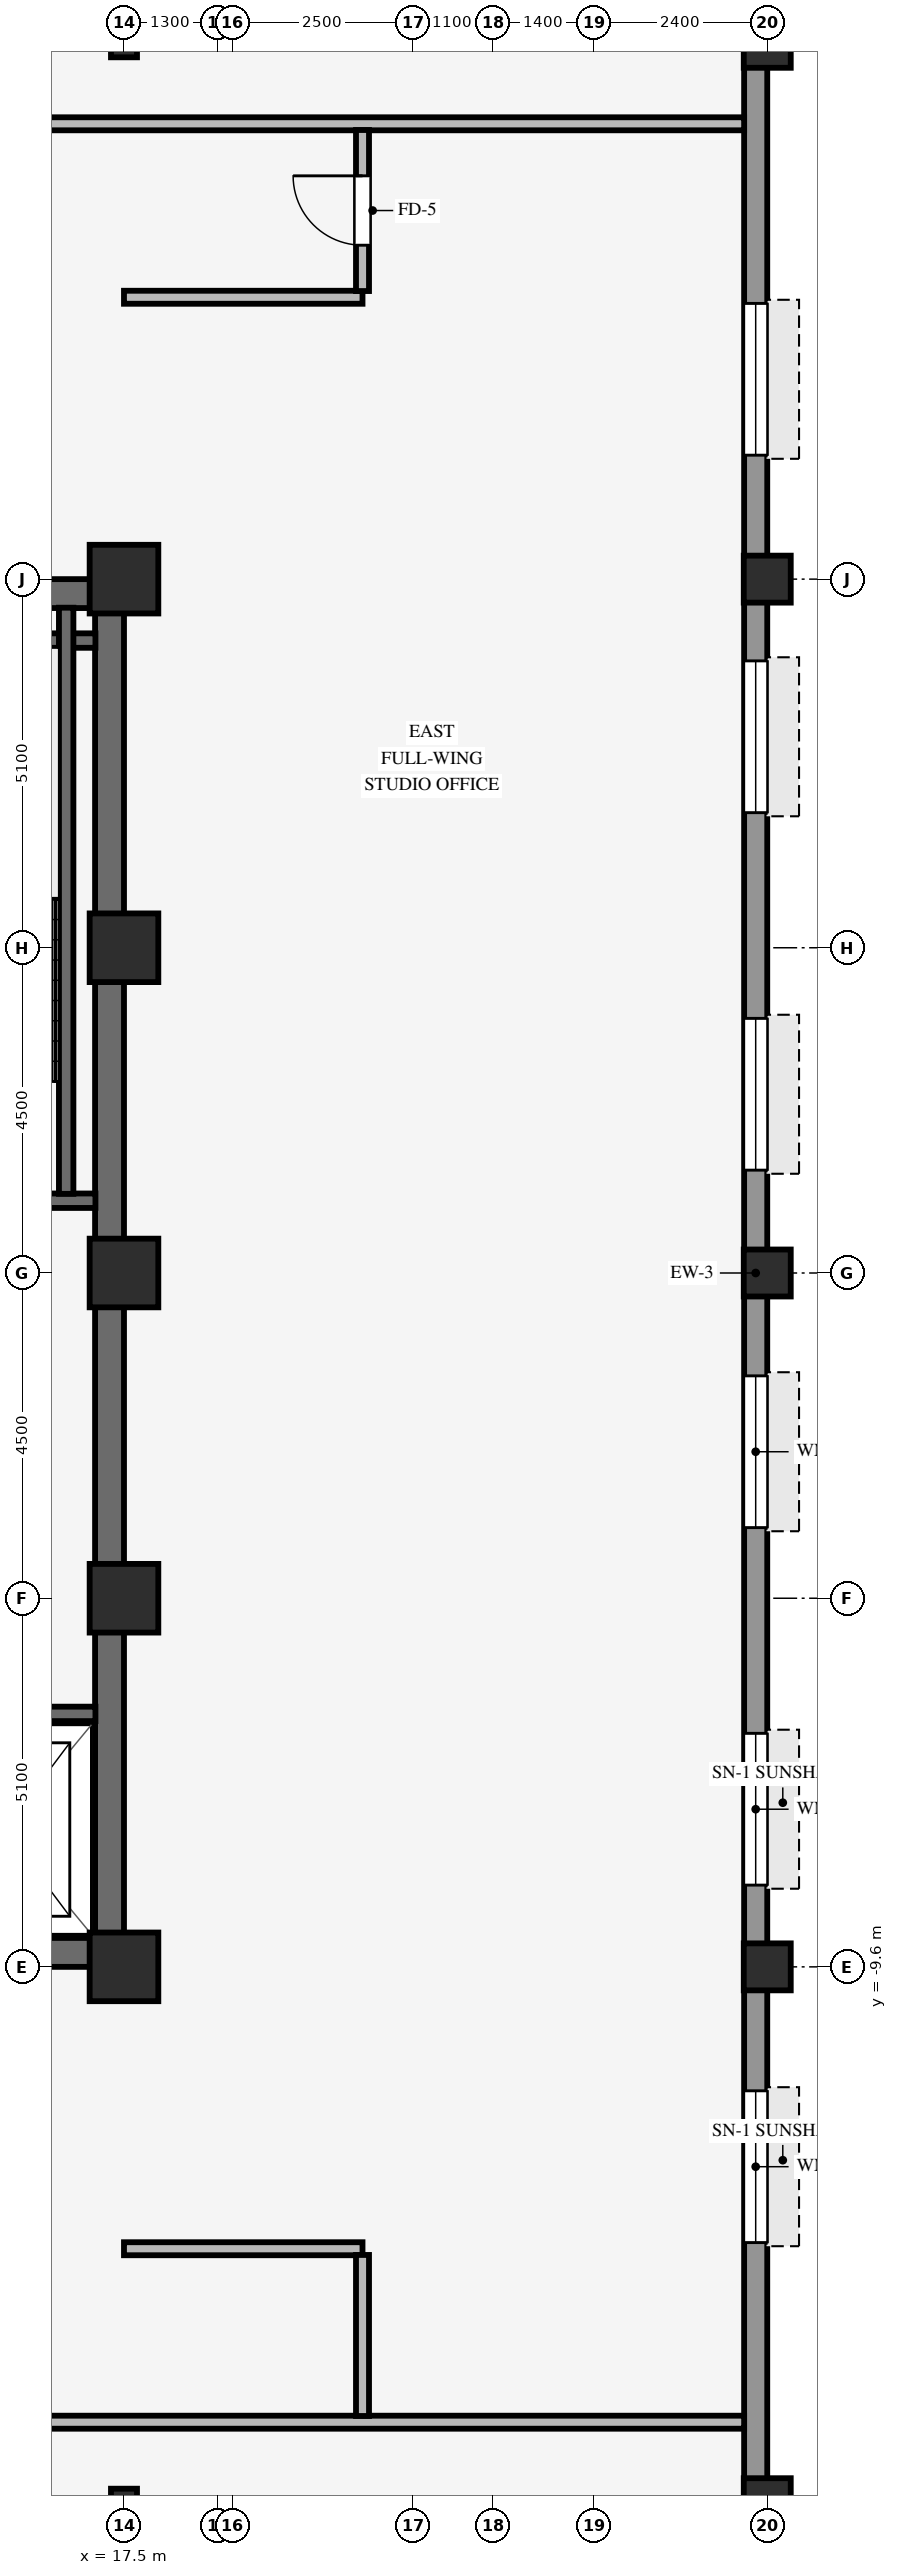
"""IFC4 building model, lengths in metres.
Left out: names, types, materials, properties, quantities, classifications, styles, units other than length and angle.
Written with IfcOpenShell. Run it as: python <this file> out.ifc"""

import sys

from ifc_helpers import new_model, si_unit, direction, frame, frame_2d, origin, origin_2d, place, context, subcontext, project, spatial, rectangle, hollow_rectangle, i_section, extrude, source, transform, mapped, element, fill, save


model = new_model("IFC4")
c1 = context("Model", 3, precision=1e-05, world=origin(), true_north=direction((0.0, 1.0)))
c2 = subcontext(c1, "Body", "Model", "MODEL_VIEW")
j1 = project(units=[si_unit("LENGTHUNIT", "METRE"), si_unit("PLANEANGLEUNIT", "RADIAN")], contexts=[c1])
p1 = place(None, origin())
s1 = spatial("IfcSite", under=j1, at=p1, CompositionType="ELEMENT")
p2 = place(p1, origin())
s2 = spatial("IfcBuilding", under=s1, at=p2, CompositionType="ELEMENT")
p3 = place(p2, frame((0.0, 0.0, 153.05)))
s3 = spatial("IfcBuildingStorey", under=s2, at=p3, CompositionType="ELEMENT", Elevation=153.05)
for number, where, z_axis, x_axis in (
    (1, (9.0, -9.4, 0.0), (0.0, 0.0, 1.0), (1.0, 0.0, 0.0)),
    (2, (9.0, 9.4, 0.0), (0.0, 0.0, 1.0), (1.0, 0.0, 0.0)),
):
    element("IfcWall", number, at=place(p3, frame(where, z_axis=z_axis, x_axis=x_axis)), inside=s3, PredefinedType="SHEAR", context=c2, shape_type="SweptSolid", body=[
        extrude(rectangle(XDim=8.5, YDim=0.4, at=frame_2d((4.25, 0.0))), origin(), (0.0, 0.0, 1.0), 3.37),
    ])
p4 = place(p3, frame((17.3, -9.205, 0.0), z_axis=(0.0, 0.0, 1.0), x_axis=(0.0, 1.0, 0.0)))
e3 = element("IfcWall", 3, at=p4, inside=s3, PredefinedType="SHEAR", context=c2, shape_type="SweptSolid", body=[
    extrude(rectangle(XDim=18.41, YDim=0.4, at=frame_2d((9.205, 0.0))), origin(), (0.0, 0.0, 1.0), 3.37),
])
for number, where, z_axis, x_axis in (
    (4, (17.5, -9.6, 0.0), (0.0, 0.0, 1.0), (1.0, 0.0, 0.0)),
    (5, (17.5, -4.5, 0.0), (0.0, 0.0, 1.0), (1.0, 0.0, 0.0)),
    (6, (17.5, 4.5, 0.0), (0.0, 0.0, 1.0), (1.0, 0.0, 0.0)),
    (7, (17.5, 9.6, 0.0), (0.0, 0.0, 1.0), (1.0, 0.0, 0.0)),
    (8, (17.5, 0.0, 0.0), (0.0, 0.0, 1.0), (1.0, 0.0, 0.0)),
):
    element("IfcColumn", number, at=place(p3, frame(where, z_axis=z_axis, x_axis=x_axis)), inside=s3, PredefinedType="COLUMN", context=c2, shape_type="SweptSolid", body=[
        extrude(rectangle(XDim=0.95, YDim=0.95, at=origin_2d()), origin(), (0.0, 0.0, 1.0), 3.37),
    ])
for number, where, z_axis, x_axis in (
    (9, (26.4, -17.0, 0.0), (0.0, 0.0, 1.0), (1.0, 0.0, 0.0)),
    (10, (26.4, -9.6, 0.0), (0.0, 0.0, 1.0), (1.0, 0.0, 0.0)),
    (11, (26.4, 0.0, 0.0), (0.0, 0.0, 1.0), (1.0, 0.0, 0.0)),
    (12, (26.4, 9.6, 0.0), (0.0, 0.0, 1.0), (1.0, 0.0, 0.0)),
    (13, (26.4, 17.0, 0.0), (0.0, 0.0, 1.0), (1.0, 0.0, 0.0)),
):
    element("IfcColumn", number, at=place(p3, frame(where, z_axis=z_axis, x_axis=x_axis)), inside=s3, PredefinedType="COLUMN", context=c2, shape_type="SweptSolid", body=[
        extrude(hollow_rectangle(XDim=0.65, YDim=0.65, WallThickness=0.04, InnerFilletRadius=0.04, OuterFilletRadius=0.08, at=origin_2d()), origin(), (0.0, 0.0, 1.0), 3.37),
    ])
for number, where, z_axis, x_axis in (
    (14, (17.5, -17.0, 0.0), (0.0, 0.0, 1.0), (1.0, 0.0, 0.0)),
    (15, (17.5, 17.0, 0.0), (0.0, 0.0, 1.0), (1.0, 0.0, 0.0)),
):
    element("IfcColumn", number, at=place(p3, frame(where, z_axis=z_axis, x_axis=x_axis)), inside=s3, PredefinedType="COLUMN", context=c2, shape_type="SweptSolid", body=[
        extrude(i_section(OverallWidth=0.36, OverallDepth=0.36, WebThickness=0.021, FlangeThickness=0.021, FilletRadius=0.018, at=origin_2d()), origin(), (0.0, 0.0, 1.0), 3.37),
    ])
p5 = place(p3, frame((26.24, -20.784, 0.0), z_axis=(0.0, 0.0, 1.0), x_axis=(0.0, 1.0, 0.0)))
e16 = element("IfcWall", 16, at=p5, inside=s3, PredefinedType="STANDARD", context=c2, shape_type="SweptSolid", body=[
    extrude(rectangle(XDim=41.568, YDim=0.32, at=frame_2d((20.784, 0.0))), origin(), (0.0, 0.0, 1.0), 2.705),
])
p6 = place(p5, frame((7.369, 0.0, 0.8)))
e17 = element("IfcOpeningElement", 17, at=p6, cuts=e16, PredefinedType="OPENING", context=c2, shape_type="SweptSolid", body=[
    extrude(rectangle(XDim=2.1, YDim=1.56, at=frame_2d((1.05, 0.78))), frame((0.0, 0.17, 0.0), z_axis=(0.0, -1.0, 0.0), x_axis=(1.0, 0.0, 0.0)), (0.0, 0.0, 1.0), 0.34),
])
p7 = place(p5, frame((12.315, 0.0, 0.8)))
e18 = element("IfcOpeningElement", 18, at=p7, cuts=e16, PredefinedType="OPENING", context=c2, shape_type="SweptSolid", body=[
    extrude(rectangle(XDim=2.1, YDim=1.56, at=frame_2d((1.05, 0.78))), frame((0.0, 0.17, 0.0), z_axis=(0.0, -1.0, 0.0), x_axis=(1.0, 0.0, 0.0)), (0.0, 0.0, 1.0), 0.34),
])
p8 = place(p5, frame((17.261, 0.0, 0.8)))
e19 = element("IfcOpeningElement", 19, at=p8, cuts=e16, PredefinedType="OPENING", context=c2, shape_type="SweptSolid", body=[
    extrude(rectangle(XDim=2.1, YDim=1.56, at=frame_2d((1.05, 0.78))), frame((0.0, 0.17, 0.0), z_axis=(0.0, -1.0, 0.0), x_axis=(1.0, 0.0, 0.0)), (0.0, 0.0, 1.0), 0.34),
])
p9 = place(p5, frame((22.207, 0.0, 0.8)))
e20 = element("IfcOpeningElement", 20, at=p9, cuts=e16, PredefinedType="OPENING", context=c2, shape_type="SweptSolid", body=[
    extrude(rectangle(XDim=2.1, YDim=1.56, at=frame_2d((1.05, 0.78))), frame((0.0, 0.17, 0.0), z_axis=(0.0, -1.0, 0.0), x_axis=(1.0, 0.0, 0.0)), (0.0, 0.0, 1.0), 0.34),
])
p10 = place(p5, frame((27.153, 0.0, 0.8)))
e21 = element("IfcOpeningElement", 21, at=p10, cuts=e16, PredefinedType="OPENING", context=c2, shape_type="SweptSolid", body=[
    extrude(rectangle(XDim=2.1, YDim=1.56, at=frame_2d((1.05, 0.78))), frame((0.0, 0.17, 0.0), z_axis=(0.0, -1.0, 0.0), x_axis=(1.0, 0.0, 0.0)), (0.0, 0.0, 1.0), 0.34),
])
p11 = place(p5, frame((32.099, 0.0, 0.8)))
e22 = element("IfcOpeningElement", 22, at=p11, cuts=e16, PredefinedType="OPENING", context=c2, shape_type="SweptSolid", body=[
    extrude(rectangle(XDim=2.1, YDim=1.56, at=frame_2d((1.05, 0.78))), frame((0.0, 0.17, 0.0), z_axis=(0.0, -1.0, 0.0), x_axis=(1.0, 0.0, 0.0)), (0.0, 0.0, 1.0), 0.34),
])
for number, where, z_axis, x_axis in (
    (23, (13.535, 1.0, 0.0), (0.0, 0.0, 1.0), (1.0, 0.0, 0.0)),
    (24, (13.535, 8.75, 0.0), (0.0, 0.0, 1.0), (1.0, 0.0, 0.0)),
):
    element("IfcWall", number, at=place(p3, frame(where, z_axis=z_axis, x_axis=x_axis)), inside=s3, PredefinedType="SHEAR", context=c2, shape_type="SweptSolid", body=[
        extrude(rectangle(XDim=3.57, YDim=0.2, at=frame_2d((1.785, 0.0))), origin(), (0.0, 0.0, 1.0), 3.37),
    ])
p12 = place(p3, frame((16.7, 1.095, 0.0), z_axis=(0.0, 0.0, 1.0), x_axis=(0.0, 1.0, 0.0)))
e25 = element("IfcWall", 25, at=p12, inside=s3, PredefinedType="SHEAR", context=c2, shape_type="SweptSolid", body=[
    extrude(rectangle(XDim=8.11, YDim=0.2, at=frame_2d((4.055, 0.0))), origin(), (0.0, 0.0, 1.0), 3.37),
])
p13 = place(p3, frame((14.645, -6.1, 0.0), z_axis=(0.0, 0.0, 1.0), x_axis=(1.0, 0.0, 0.0)))
e26 = element("IfcWall", 26, at=p13, inside=s3, PredefinedType="SHEAR", context=c2, shape_type="SweptSolid", body=[
    extrude(rectangle(XDim=2.46, YDim=0.2, at=frame_2d((1.23, 0.0))), origin(), (0.0, 0.0, 1.0), 3.37),
])
p14 = place(p3, frame((-26.08, -15.9, 0.0), z_axis=(0.0, 0.0, 1.0), x_axis=(1.0, 0.0, 0.0)))
e27 = element("IfcWall", 27, at=p14, inside=s3, PredefinedType="PARTITIONING", context=c2, shape_type="SweptSolid", body=[
    extrude(rectangle(XDim=52.16, YDim=0.18, at=frame_2d((26.08, 0.0))), origin(), (0.0, 0.0, 1.0), 3.36),
])
p15 = place(p14, frame((24.5, 0.0, 0.0)))
e28 = element("IfcOpeningElement", 28, at=p15, cuts=e27, PredefinedType="OPENING", context=c2, shape_type="SweptSolid", body=[
    extrude(rectangle(XDim=0.96, YDim=2.1, at=frame_2d((0.48, 1.05))), frame((0.0, 0.1, 0.0), z_axis=(0.0, -1.0, 0.0), x_axis=(1.0, 0.0, 0.0)), (0.0, 0.0, 1.0), 0.2),
])
p16 = place(p14, frame((40.5, 0.0, 0.0)))
e29 = element("IfcOpeningElement", 29, at=p16, cuts=e27, PredefinedType="OPENING", context=c2, shape_type="SweptSolid", body=[
    extrude(rectangle(XDim=0.96, YDim=2.1, at=frame_2d((0.48, 1.05))), frame((0.0, 0.1, 0.0), z_axis=(0.0, -1.0, 0.0), x_axis=(1.0, 0.0, 0.0)), (0.0, 0.0, 1.0), 0.2),
])
p17 = place(p14, frame((13.16, 0.0, 0.0)))
e30 = element("IfcOpeningElement", 30, at=p17, cuts=e27, PredefinedType="OPENING", context=c2, shape_type="SweptSolid", body=[
    extrude(rectangle(XDim=0.96, YDim=2.1, at=frame_2d((0.48, 1.05))), frame((0.0, 0.1, 0.0), z_axis=(0.0, -1.0, 0.0), x_axis=(1.0, 0.0, 0.0)), (0.0, 0.0, 1.0), 0.2),
])
p18 = place(p14, frame((6.425, 0.0, 0.0)))
e31 = element("IfcOpeningElement", 31, at=p18, cuts=e27, PredefinedType="OPENING", context=c2, shape_type="SweptSolid", body=[
    extrude(rectangle(XDim=0.96, YDim=2.1, at=frame_2d((0.48, 1.05))), frame((0.0, 0.1, 0.0), z_axis=(0.0, -1.0, 0.0), x_axis=(1.0, 0.0, 0.0)), (0.0, 0.0, 1.0), 0.2),
])
for number, where, z_axis, x_axis in (
    (32, (17.5, -13.5, 0.0), (0.0, 0.0, 1.0), (1.0, 0.0, 0.0)),
    (33, (17.5, 13.5, 0.0), (0.0, 0.0, 1.0), (1.0, 0.0, 0.0)),
):
    element("IfcWall", number, at=place(p3, frame(where, z_axis=z_axis, x_axis=x_axis)), inside=s3, PredefinedType="PARTITIONING", context=c2, shape_type="SweptSolid", body=[
        extrude(rectangle(XDim=3.3, YDim=0.18, at=frame_2d((1.65, 0.0))), origin(), (0.0, 0.0, 1.0), 2.998),
    ])
p19 = place(p3, frame((-26.08, 15.9, 0.0), z_axis=(0.0, 0.0, 1.0), x_axis=(1.0, 0.0, 0.0)))
e34 = element("IfcWall", 34, at=p19, inside=s3, PredefinedType="PARTITIONING", context=c2, shape_type="SweptSolid", body=[
    extrude(rectangle(XDim=52.16, YDim=0.18, at=frame_2d((26.08, 0.0))), origin(), (0.0, 0.0, 1.0), 3.36),
])
p20 = place(p19, frame((26.72, 0.0, 0.0)))
e35 = element("IfcOpeningElement", 35, at=p20, cuts=e34, PredefinedType="OPENING", context=c2, shape_type="SweptSolid", body=[
    extrude(rectangle(XDim=0.96, YDim=2.1, at=frame_2d((0.48, 1.05))), frame((0.0, 0.1, 0.0), z_axis=(0.0, -1.0, 0.0), x_axis=(1.0, 0.0, 0.0)), (0.0, 0.0, 1.0), 0.2),
])
p21 = place(p19, frame((40.5, 0.0, 0.0)))
e36 = element("IfcOpeningElement", 36, at=p21, cuts=e34, PredefinedType="OPENING", context=c2, shape_type="SweptSolid", body=[
    extrude(rectangle(XDim=0.96, YDim=2.1, at=frame_2d((0.48, 1.05))), frame((0.0, 0.1, 0.0), z_axis=(0.0, -1.0, 0.0), x_axis=(1.0, 0.0, 0.0)), (0.0, 0.0, 1.0), 0.2),
])
p22 = place(p19, frame((13.61, 0.0, 0.0)))
e37 = element("IfcOpeningElement", 37, at=p22, cuts=e34, PredefinedType="OPENING", context=c2, shape_type="SweptSolid", body=[
    extrude(rectangle(XDim=0.96, YDim=2.1, at=frame_2d((0.48, 1.05))), frame((0.0, 0.1, 0.0), z_axis=(0.0, -1.0, 0.0), x_axis=(1.0, 0.0, 0.0)), (0.0, 0.0, 1.0), 0.2),
])
p23 = place(p3, frame((20.8, -15.814, 0.0), z_axis=(0.0, 0.0, 1.0), x_axis=(0.0, 1.0, 0.0)))
e38 = element("IfcWall", 38, at=p23, inside=s3, PredefinedType="PARTITIONING", context=c2, shape_type="SweptSolid", body=[
    extrude(rectangle(XDim=2.228, YDim=0.18, at=frame_2d((1.114, 0.0))), origin(), (0.0, 0.0, 1.0), 3.36),
])
p24 = place(p3, frame((20.8, 13.586, 0.0), z_axis=(0.0, 0.0, 1.0), x_axis=(0.0, 1.0, 0.0)))
e39 = element("IfcWall", 39, at=p24, inside=s3, PredefinedType="PARTITIONING", context=c2, shape_type="SweptSolid", body=[
    extrude(rectangle(XDim=2.228, YDim=0.18, at=frame_2d((1.114, 0.0))), origin(), (0.0, 0.0, 1.0), 3.36),
])
p25 = place(p24, frame((0.634, 0.0, 0.0)))
e40 = element("IfcOpeningElement", 40, at=p25, cuts=e39, PredefinedType="OPENING", context=c2, shape_type="SweptSolid", body=[
    extrude(rectangle(XDim=0.96, YDim=2.1, at=frame_2d((0.48, 1.05))), frame((0.0, 0.1, 0.0), z_axis=(0.0, -1.0, 0.0), x_axis=(1.0, 0.0, 0.0)), (0.0, 0.0, 1.0), 0.2),
])
m1 = source(origin(), c2, "Body", "SweptSolid", [
    extrude(rectangle(XDim=2.1, YDim=1.56, at=frame_2d((1.05, 0.78))), frame((0.0, 0.03, 0.0), z_axis=(0.0, -1.0, 0.0), x_axis=(1.0, 0.0, 0.0)), (0.0, 0.0, 1.0), 0.06),
])
p26 = place(p6, origin())
e41 = element("IfcWindow", 41, at=p26, inside=s3, PartitioningType="SINGLE_PANEL", PredefinedType="WINDOW", context=c2, shape_type="MappedRepresentation", body=[
    mapped(m1, transform((0.0, 0.0, 0.0), scale=1.0)),
])
fill(e17, e41)
p27 = place(p7, origin())
e42 = element("IfcWindow", 42, at=p27, inside=s3, PartitioningType="SINGLE_PANEL", PredefinedType="WINDOW", context=c2, shape_type="MappedRepresentation", body=[
    mapped(m1, transform((0.0, 0.0, 0.0), scale=1.0)),
])
fill(e18, e42)
p28 = place(p8, origin())
e43 = element("IfcWindow", 43, at=p28, inside=s3, PartitioningType="SINGLE_PANEL", PredefinedType="WINDOW", context=c2, shape_type="MappedRepresentation", body=[
    mapped(m1, transform((0.0, 0.0, 0.0), scale=1.0)),
])
fill(e19, e43)
p29 = place(p9, origin())
e44 = element("IfcWindow", 44, at=p29, inside=s3, PartitioningType="SINGLE_PANEL", PredefinedType="WINDOW", context=c2, shape_type="MappedRepresentation", body=[
    mapped(m1, transform((0.0, 0.0, 0.0), scale=1.0)),
])
fill(e20, e44)
p30 = place(p10, origin())
e45 = element("IfcWindow", 45, at=p30, inside=s3, PartitioningType="SINGLE_PANEL", PredefinedType="WINDOW", context=c2, shape_type="MappedRepresentation", body=[
    mapped(m1, transform((0.0, 0.0, 0.0), scale=1.0)),
])
fill(e21, e45)
p31 = place(p11, origin())
e46 = element("IfcWindow", 46, at=p31, inside=s3, PartitioningType="SINGLE_PANEL", PredefinedType="WINDOW", context=c2, shape_type="MappedRepresentation", body=[
    mapped(m1, transform((0.0, 0.0, 0.0), scale=1.0)),
])
fill(e22, e46)
m2 = source(origin(), c2, "Body", "SweptSolid", [
    extrude(rectangle(XDim=0.96, YDim=2.1, at=frame_2d((0.48, 1.05))), frame((0.0, 0.025, 0.0), z_axis=(0.0, -1.0, 0.0), x_axis=(1.0, 0.0, 0.0)), (0.0, 0.0, 1.0), 0.05),
])
p32 = place(p25, origin())
e47 = element("IfcDoor", 47, at=p32, inside=s3, OperationType="SINGLE_SWING_RIGHT", PredefinedType="DOOR", context=c2, shape_type="MappedRepresentation", body=[
    mapped(m2, transform((0.0, 0.0, 0.0), scale=1.0)),
])
fill(e40, e47)
save(model, sys.argv[1])
